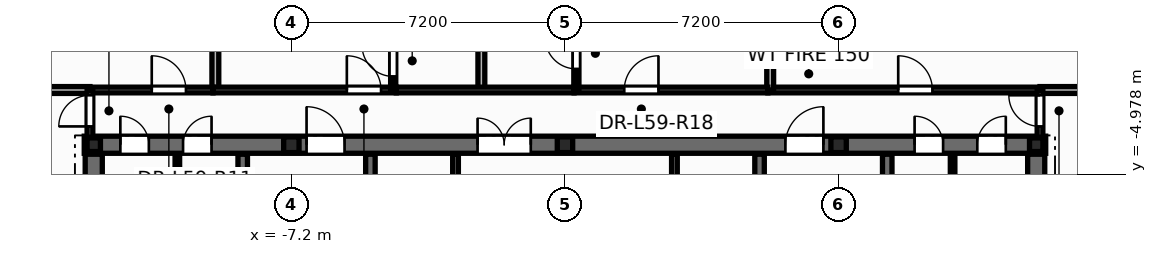
"""IFC4 building model, lengths in metres.
Left out: names, types, materials, properties, quantities, classifications, styles, units other than length and angle.
Written with IfcOpenShell. Run it as: python <this file> out.ifc"""

import sys

from ifc_helpers import new_model, si_unit, direction, frame, frame_2d, origin, origin_2d, place, context, subcontext, project, spatial, rectangle, i_section, extrude, element, fill, save


model = new_model("IFC4")
c1 = context("Model", 3, precision=1e-05, world=origin(), true_north=direction((0.0, 1.0)))
c2 = subcontext(c1, "Body", "Model", "MODEL_VIEW")
j1 = project(units=[si_unit("LENGTHUNIT", "METRE"), si_unit("PLANEANGLEUNIT", "RADIAN")], contexts=[c1])
p1 = place(None, origin())
s1 = spatial("IfcSite", under=j1, at=p1, CompositionType="ELEMENT")
p2 = place(p1, origin())
s2 = spatial("IfcBuilding", under=s1, at=p2, CompositionType="ELEMENT")
p3 = place(p2, frame((0.0, 0.0, 225.3)))
s3 = spatial("IfcBuildingStorey", under=s2, at=p3, CompositionType="ELEMENT", Elevation=225.3)
for number, where, z_axis, x_axis in (
    (1, (12.4, -4.2, 0.0), (0.0, 0.0, 1.0), (1.0, 0.0, 0.0)),
    (2, (-12.4, -4.2, 0.0), (0.0, 0.0, 1.0), (1.0, 0.0, 0.0)),
):
    element("IfcColumn", number, at=place(p3, frame(where, z_axis=z_axis, x_axis=x_axis)), inside=s3, PredefinedType="COLUMN", context=c2, shape_type="SweptSolid", body=[
        extrude(i_section(OverallWidth=0.352, OverallDepth=0.359, WebThickness=0.018, FlangeThickness=0.026, at=origin_2d()), origin(), (0.0, 0.0, 1.0), 3.6),
    ])
for number, where, z_axis, x_axis in (
    (3, (-7.2, -4.2, 0.0), (0.0, 0.0, 1.0), (1.0, 0.0, 0.0)),
    (4, (0.0, -4.2, 0.0), (0.0, 0.0, 1.0), (1.0, 0.0, 0.0)),
    (5, (7.2, -4.2, 0.0), (0.0, 0.0, 1.0), (1.0, 0.0, 0.0)),
):
    element("IfcColumn", number, at=place(p3, frame(where, z_axis=z_axis, x_axis=x_axis)), inside=s3, PredefinedType="PILASTER", context=c2, shape_type="SweptSolid", body=[
        extrude(i_section(OverallWidth=0.405, OverallDepth=0.414, WebThickness=0.022, FlangeThickness=0.032, at=origin_2d()), origin(), (0.0, 0.0, 1.0), 3.6),
    ])
p4 = place(p3, frame((-2.88, -7.1, 0.0), z_axis=(0.0, 0.0, 1.0), x_axis=(0.0, 1.0, 0.0)))
e6 = element("IfcWall", 6, at=p4, inside=s3, PredefinedType="PARTITIONING", context=c2, shape_type="SweptSolid", body=[
    extrude(rectangle(XDim=2.65, YDim=0.15, at=frame_2d((1.325, 0.0))), origin(), (0.0, 0.0, 1.0), 3.32),
])
p5 = place(p4, frame((0.85, 0.0, 0.0)))
e7 = element("IfcOpeningElement", 7, at=p5, cuts=e6, PredefinedType="OPENING", context=c2, shape_type="SweptSolid", body=[
    extrude(rectangle(XDim=0.886, YDim=2.104, at=frame_2d((0.44, 1.052))), frame((0.0, 0.085, 0.0), z_axis=(0.0, -1.0, 0.0), x_axis=(1.0, 0.0, 0.0)), (0.0, 0.0, 1.0), 0.17),
])
p6 = place(p3, frame((2.88, -7.1, 0.0), z_axis=(0.0, 0.0, 1.0), x_axis=(0.0, 1.0, 0.0)))
e8 = element("IfcWall", 8, at=p6, inside=s3, PredefinedType="PARTITIONING", context=c2, shape_type="SweptSolid", body=[
    extrude(rectangle(XDim=2.65, YDim=0.15, at=frame_2d((1.325, 0.0))), origin(), (0.0, 0.0, 1.0), 3.32),
])
p7 = place(p6, frame((0.85, 0.0, 0.0)))
e9 = element("IfcOpeningElement", 9, at=p7, cuts=e8, PredefinedType="OPENING", context=c2, shape_type="SweptSolid", body=[
    extrude(rectangle(XDim=0.886, YDim=2.104, at=frame_2d((0.44, 1.052))), frame((0.0, 0.085, 0.0), z_axis=(0.0, -1.0, 0.0), x_axis=(1.0, 0.0, 0.0)), (0.0, 0.0, 1.0), 0.17),
])
for number, where, z_axis, x_axis in (
    (10, (-10.2, -5.52, 0.0), (0.0, 0.0, 1.0), (0.0, 1.0, 0.0)),
    (11, (10.2, -5.52, 0.0), (0.0, 0.0, 1.0), (0.0, 1.0, 0.0)),
):
    element("IfcWall", number, at=place(p3, frame(where, z_axis=z_axis, x_axis=x_axis)), inside=s3, PredefinedType="PARTITIONING", context=c2, shape_type="SweptSolid", body=[
        extrude(rectangle(XDim=1.12, YDim=0.12, at=frame_2d((0.56, 0.0))), origin(), (0.0, 0.0, 1.0), 3.32),
    ])
p8 = place(p3, frame((-12.65, -4.2, 0.0), z_axis=(0.0, 0.0, 1.0), x_axis=(1.0, 0.0, 0.0)))
e12 = element("IfcWall", 12, at=p8, inside=s3, PredefinedType="SHEAR", context=c2, shape_type="SweptSolid", body=[
    extrude(rectangle(XDim=25.3, YDim=0.45, at=frame_2d((12.65, 0.0))), origin(), (0.0, 0.0, 1.0), 3.6),
])
p9 = place(p8, frame((0.95, 0.0, 0.0)))
e13 = element("IfcOpeningElement", 13, at=p9, cuts=e12, PredefinedType="OPENING", context=c2, shape_type="SweptSolid", body=[
    extrude(rectangle(XDim=0.756, YDim=2.054, at=frame_2d((0.375, 1.027))), frame((0.0, 0.235, 0.0), z_axis=(0.0, -1.0, 0.0), x_axis=(1.0, 0.0, 0.0)), (0.0, 0.0, 1.0), 0.47),
])
p10 = place(p8, frame((2.6, 0.0, 0.0)))
e14 = element("IfcOpeningElement", 14, at=p10, cuts=e12, PredefinedType="OPENING", context=c2, shape_type="SweptSolid", body=[
    extrude(rectangle(XDim=0.756, YDim=2.054, at=frame_2d((0.375, 1.027))), frame((0.0, 0.235, 0.0), z_axis=(0.0, -1.0, 0.0), x_axis=(1.0, 0.0, 0.0)), (0.0, 0.0, 1.0), 0.47),
])
p11 = place(p8, frame((21.85, 0.0, 0.0)))
e15 = element("IfcOpeningElement", 15, at=p11, cuts=e12, PredefinedType="OPENING", context=c2, shape_type="SweptSolid", body=[
    extrude(rectangle(XDim=0.756, YDim=2.054, at=frame_2d((0.375, 1.027))), frame((0.0, 0.235, 0.0), z_axis=(0.0, -1.0, 0.0), x_axis=(1.0, 0.0, 0.0)), (0.0, 0.0, 1.0), 0.47),
])
p12 = place(p8, frame((23.5, 0.0, 0.0)))
e16 = element("IfcOpeningElement", 16, at=p12, cuts=e12, PredefinedType="OPENING", context=c2, shape_type="SweptSolid", body=[
    extrude(rectangle(XDim=0.756, YDim=2.054, at=frame_2d((0.375, 1.027))), frame((0.0, 0.235, 0.0), z_axis=(0.0, -1.0, 0.0), x_axis=(1.0, 0.0, 0.0)), (0.0, 0.0, 1.0), 0.47),
])
p13 = place(p8, frame((5.85, 0.0, 0.0)))
e17 = element("IfcOpeningElement", 17, at=p13, cuts=e12, PredefinedType="OPENING", context=c2, shape_type="SweptSolid", body=[
    extrude(rectangle(XDim=1.006, YDim=2.104, at=frame_2d((0.5, 1.052))), frame((0.0, 0.235, 0.0), z_axis=(0.0, -1.0, 0.0), x_axis=(1.0, 0.0, 0.0)), (0.0, 0.0, 1.0), 0.47),
])
p14 = place(p8, frame((10.35, 0.0, 0.0)))
e18 = element("IfcOpeningElement", 18, at=p14, cuts=e12, PredefinedType="OPENING", context=c2, shape_type="SweptSolid", body=[
    extrude(rectangle(XDim=1.406, YDim=2.154, at=frame_2d((0.7, 1.077))), frame((0.0, 0.235, 0.0), z_axis=(0.0, -1.0, 0.0), x_axis=(1.0, 0.0, 0.0)), (0.0, 0.0, 1.0), 0.47),
])
p15 = place(p8, frame((18.45, 0.0, 0.0)))
e19 = element("IfcOpeningElement", 19, at=p15, cuts=e12, PredefinedType="OPENING", context=c2, shape_type="SweptSolid", body=[
    extrude(rectangle(XDim=1.006, YDim=2.104, at=frame_2d((0.5, 1.052))), frame((0.0, 0.235, 0.0), z_axis=(0.0, -1.0, 0.0), x_axis=(1.0, 0.0, 0.0)), (0.0, 0.0, 1.0), 0.47),
])
p16 = place(p3, frame((-8.48, -13.85, 0.0), z_axis=(0.0, 0.0, 1.0), x_axis=(0.0, 1.0, 0.0)))
e20 = element("IfcWall", 20, at=p16, inside=s3, PredefinedType="SHEAR", context=c2, shape_type="SweptSolid", body=[
    extrude(rectangle(XDim=9.4, YDim=0.25, at=frame_2d((4.7, 0.0))), origin(), (0.0, 0.0, 1.0), 3.6),
])
p17 = place(p16, frame((6.95, 0.0, 0.0)))
e21 = element("IfcOpeningElement", 21, at=p17, cuts=e20, PredefinedType="OPENING", context=c2, shape_type="SweptSolid", body=[
    extrude(rectangle(XDim=1.006, YDim=2.104, at=frame_2d((0.5, 1.052))), frame((0.0, 0.135, 0.0), z_axis=(0.0, -1.0, 0.0), x_axis=(1.0, 0.0, 0.0)), (0.0, 0.0, 1.0), 0.27),
])
p18 = place(p3, frame((8.48, -13.85, 0.0), z_axis=(0.0, 0.0, 1.0), x_axis=(0.0, 1.0, 0.0)))
e22 = element("IfcWall", 22, at=p18, inside=s3, PredefinedType="SHEAR", context=c2, shape_type="SweptSolid", body=[
    extrude(rectangle(XDim=9.4, YDim=0.25, at=frame_2d((4.7, 0.0))), origin(), (0.0, 0.0, 1.0), 3.6),
])
p19 = place(p18, frame((6.95, 0.0, 0.0)))
e23 = element("IfcOpeningElement", 23, at=p19, cuts=e22, PredefinedType="OPENING", context=c2, shape_type="SweptSolid", body=[
    extrude(rectangle(XDim=1.006, YDim=2.104, at=frame_2d((0.5, 1.052))), frame((0.0, 0.135, 0.0), z_axis=(0.0, -1.0, 0.0), x_axis=(1.0, 0.0, 0.0)), (0.0, 0.0, 1.0), 0.27),
])
for number, where, z_axis, x_axis in (
    (24, (-5.12, -13.85, 0.0), (0.0, 0.0, 1.0), (0.0, 1.0, 0.0)),
    (25, (5.12, -13.85, 0.0), (0.0, 0.0, 1.0), (0.0, 1.0, 0.0)),
):
    element("IfcWall", number, at=place(p3, frame(where, z_axis=z_axis, x_axis=x_axis)), inside=s3, PredefinedType="SHEAR", context=c2, shape_type="SweptSolid", body=[
        extrude(rectangle(XDim=9.4, YDim=0.25, at=frame_2d((4.7, 0.0))), origin(), (0.0, 0.0, 1.0), 3.6),
    ])
for number, where, z_axis, x_axis in (
    (26, (-12.4, -13.85, 0.0), (0.0, 0.0, 1.0), (0.0, 1.0, 0.0)),
    (27, (12.4, -13.85, 0.0), (0.0, 0.0, 1.0), (0.0, 1.0, 0.0)),
):
    element("IfcWall", number, at=place(p3, frame(where, z_axis=z_axis, x_axis=x_axis)), inside=s3, PredefinedType="SHEAR", context=c2, shape_type="SweptSolid", body=[
        extrude(rectangle(XDim=9.4, YDim=0.45, at=frame_2d((4.7, 0.0))), origin(), (0.0, 0.0, 1.0), 3.6),
    ])
p20 = place(p3, frame((-9.2, -2.76, 0.0), z_axis=(0.0, 0.0, 1.0), x_axis=(0.0, 1.0, 0.0)))
e28 = element("IfcWall", 28, at=p20, inside=s3, PredefinedType="PARTITIONING", context=c2, shape_type="SweptSolid", body=[
    extrude(rectangle(XDim=7.742, YDim=0.18, at=frame_2d((3.871, 0.0))), origin(), (0.0, 0.0, 1.0), 2.595),
])
p21 = place(p3, frame((5.34, -2.76, 0.0), z_axis=(0.0, 0.0, 1.0), x_axis=(1.0, 0.0, 0.0)))
e29 = element("IfcWall", 29, at=p21, inside=s3, PredefinedType="PARTITIONING", context=c2, shape_type="SweptSolid", body=[
    extrude(rectangle(XDim=7.16, YDim=0.15, at=frame_2d((3.58, 0.0))), origin(), (0.0, 0.0, 1.0), 2.295),
])
p22 = place(p21, frame((3.429, 0.0, 0.0)))
e30 = element("IfcOpeningElement", 30, at=p22, cuts=e29, PredefinedType="OPENING", context=c2, shape_type="SweptSolid", body=[
    extrude(rectangle(XDim=0.906, YDim=2.104, at=frame_2d((0.45, 1.052))), frame((0.0, 0.085, 0.0), z_axis=(0.0, -1.0, 0.0), x_axis=(1.0, 0.0, 0.0)), (0.0, 0.0, 1.0), 0.17),
])
p23 = place(p3, frame((5.4, -2.76, 0.0), z_axis=(0.0, 0.0, 1.0), x_axis=(0.0, 1.0, 0.0)))
e31 = element("IfcWall", 31, at=p23, inside=s3, PredefinedType="PARTITIONING", context=c2, shape_type="SweptSolid", body=[
    extrude(rectangle(XDim=13.037, YDim=0.18, at=frame_2d((6.518, 0.0))), origin(), (0.0, 0.0, 1.0), 2.295),
])
p24 = place(p3, frame((0.24, -2.76, 0.0), z_axis=(0.0, 0.0, 1.0), x_axis=(1.0, 0.0, 0.0)))
e32 = element("IfcWall", 32, at=p24, inside=s3, PredefinedType="PARTITIONING", context=c2, shape_type="SweptSolid", body=[
    extrude(rectangle(XDim=5.098, YDim=0.15, at=frame_2d((2.549, 0.0))), origin(), (0.0, 0.0, 1.0), 2.939),
])
p25 = place(p24, frame((1.32, 0.0, 0.0)))
e33 = element("IfcOpeningElement", 33, at=p25, cuts=e32, PredefinedType="OPENING", context=c2, shape_type="SweptSolid", body=[
    extrude(rectangle(XDim=0.906, YDim=2.104, at=frame_2d((0.45, 1.052))), frame((0.0, 0.085, 0.0), z_axis=(0.0, -1.0, 0.0), x_axis=(1.0, 0.0, 0.0)), (0.0, 0.0, 1.0), 0.17),
])
p26 = place(p3, frame((-9.26, -2.76, 0.0), z_axis=(0.0, 0.0, 1.0), x_axis=(1.0, 0.0, 0.0)))
e34 = element("IfcWall", 34, at=p26, inside=s3, PredefinedType="PARTITIONING", context=c2, shape_type="SweptSolid", body=[
    extrude(rectangle(XDim=4.82, YDim=0.15, at=frame_2d((2.41, 0.0))), origin(), (0.0, 0.0, 1.0), 2.295),
])
p27 = place(p26, frame((3.52, 0.0, 0.0)))
e35 = element("IfcOpeningElement", 35, at=p27, cuts=e34, PredefinedType="OPENING", context=c2, shape_type="SweptSolid", body=[
    extrude(rectangle(XDim=0.906, YDim=2.104, at=frame_2d((0.45, 1.052))), frame((0.0, 0.085, 0.0), z_axis=(0.0, -1.0, 0.0), x_axis=(1.0, 0.0, 0.0)), (0.0, 0.0, 1.0), 0.17),
])
p28 = place(p3, frame((-2.2, -2.76, 0.0), z_axis=(0.0, 0.0, 1.0), x_axis=(0.0, 1.0, 0.0)))
e36 = element("IfcWall", 36, at=p28, inside=s3, PredefinedType="PARTITIONING", context=c2, shape_type="SweptSolid", body=[
    extrude(rectangle(XDim=9.62, YDim=0.18, at=frame_2d((4.81, 0.0))), origin(), (0.0, 0.0, 1.0), 2.295),
])
p29 = place(p3, frame((-12.5, -2.76, 0.0), z_axis=(0.0, 0.0, 1.0), x_axis=(1.0, 0.0, 0.0)))
e37 = element("IfcWall", 37, at=p29, inside=s3, PredefinedType="PARTITIONING", context=c2, shape_type="SweptSolid", body=[
    extrude(rectangle(XDim=3.238, YDim=0.15, at=frame_2d((1.619, 0.0))), origin(), (0.0, 0.0, 1.0), 3.32),
])
p30 = place(p29, frame((1.626, 0.0, 0.0)))
e38 = element("IfcOpeningElement", 38, at=p30, cuts=e37, PredefinedType="OPENING", context=c2, shape_type="SweptSolid", body=[
    extrude(rectangle(XDim=0.906, YDim=2.104, at=frame_2d((0.45, 1.052))), frame((0.0, 0.085, 0.0), z_axis=(0.0, -1.0, 0.0), x_axis=(1.0, 0.0, 0.0)), (0.0, 0.0, 1.0), 0.17),
])
p31 = place(p3, frame((-4.52, -2.76, 0.0), z_axis=(0.0, 0.0, 1.0), x_axis=(0.0, 1.0, 0.0)))
e39 = element("IfcWall", 39, at=p31, inside=s3, PredefinedType="PARTITIONING", context=c2, shape_type="SweptSolid", body=[
    extrude(rectangle(XDim=2.92, YDim=0.135, at=frame_2d((1.46, 0.0))), origin(), (0.0, 0.0, 1.0), 3.32),
])
p32 = place(p31, frame((0.357, 0.0, 0.0)))
e40 = element("IfcOpeningElement", 40, at=p32, cuts=e39, PredefinedType="OPENING", context=c2, shape_type="SweptSolid", body=[
    extrude(rectangle(XDim=0.826, YDim=2.104, at=frame_2d((0.41, 1.052))), frame((0.0, 0.078, 0.0), z_axis=(0.0, -1.0, 0.0), x_axis=(1.0, 0.0, 0.0)), (0.0, 0.0, 1.0), 0.155),
])
p33 = place(p3, frame((0.3, -2.76, 0.0), z_axis=(0.0, 0.0, 1.0), x_axis=(0.0, 1.0, 0.0)))
e41 = element("IfcWall", 41, at=p33, inside=s3, PredefinedType="PARTITIONING", context=c2, shape_type="SweptSolid", body=[
    extrude(rectangle(XDim=2.92, YDim=0.135, at=frame_2d((1.46, 0.0))), origin(), (0.0, 0.0, 1.0), 2.295),
])
p34 = place(p33, frame((0.555, 0.0, 0.0)))
e42 = element("IfcOpeningElement", 42, at=p34, cuts=e41, PredefinedType="OPENING", context=c2, shape_type="SweptSolid", body=[
    extrude(rectangle(XDim=0.826, YDim=2.104, at=frame_2d((0.41, 1.052))), frame((0.0, 0.078, 0.0), z_axis=(0.0, -1.0, 0.0), x_axis=(1.0, 0.0, 0.0)), (0.0, 0.0, 1.0), 0.155),
])
p35 = place(p3, frame((-4.438, -2.76, 0.0), z_axis=(0.0, 0.0, 1.0), x_axis=(1.0, 0.0, 0.0)))
e43 = element("IfcWall", 43, at=p35, inside=s3, PredefinedType="PARTITIONING", context=c2, shape_type="SweptSolid", body=[
    extrude(rectangle(XDim=4.676, YDim=0.15, at=frame_2d((2.338, 0.0))), origin(), (0.0, 0.0, 1.0), 2.295),
])
for number, where, z_axis, x_axis in (
    (44, (-14.757, -2.76, 0.0), (0.0, 0.0, 1.0), (1.0, 0.0, 0.0)),
    (45, (12.5, -2.76, 0.0), (0.0, 0.0, 1.0), (1.0, 0.0, 0.0)),
):
    element("IfcWall", number, at=place(p3, frame(where, z_axis=z_axis, x_axis=x_axis)), inside=s3, PredefinedType="PARTITIONING", context=c2, shape_type="SweptSolid", body=[
        extrude(rectangle(XDim=2.257, YDim=0.18, at=frame_2d((1.129, 0.0))), origin(), (0.0, 0.0, 1.0), 2.595),
    ])
p36 = place(p3, frame((-12.5, -4.24, 0.0), z_axis=(0.0, 0.0, 1.0), x_axis=(0.0, 1.0, 0.0)))
e46 = element("IfcWall", 46, at=p36, inside=s3, PredefinedType="PARTITIONING", context=c2, shape_type="SweptSolid", body=[
    extrude(rectangle(XDim=1.48, YDim=0.15, at=frame_2d((0.74, 0.0))), origin(), (0.0, 0.0, 1.0), 2.295),
])
p37 = place(p36, frame((0.522, 0.0, 0.0)))
e47 = element("IfcOpeningElement", 47, at=p37, cuts=e46, PredefinedType="OPENING", context=c2, shape_type="SweptSolid", body=[
    extrude(rectangle(XDim=0.826, YDim=2.104, at=frame_2d((0.41, 1.052))), frame((0.0, 0.085, 0.0), z_axis=(0.0, -1.0, 0.0), x_axis=(1.0, 0.0, 0.0)), (0.0, 0.0, 1.0), 0.17),
])
p38 = place(p3, frame((12.5, -4.24, 0.0), z_axis=(0.0, 0.0, 1.0), x_axis=(0.0, 1.0, 0.0)))
e48 = element("IfcWall", 48, at=p38, inside=s3, PredefinedType="PARTITIONING", context=c2, shape_type="SweptSolid", body=[
    extrude(rectangle(XDim=1.48, YDim=0.15, at=frame_2d((0.74, 0.0))), origin(), (0.0, 0.0, 1.0), 2.295),
])
p39 = place(p38, frame((0.522, 0.0, 0.0)))
e49 = element("IfcOpeningElement", 49, at=p39, cuts=e48, PredefinedType="OPENING", context=c2, shape_type="SweptSolid", body=[
    extrude(rectangle(XDim=0.826, YDim=2.104, at=frame_2d((0.41, 1.052))), frame((0.0, 0.085, 0.0), z_axis=(0.0, -1.0, 0.0), x_axis=(1.0, 0.0, 0.0)), (0.0, 0.0, 1.0), 0.17),
])
p40 = place(p9, origin())
e50 = element("IfcDoor", 50, at=p40, inside=s3, OperationType="SINGLE_SWING_LEFT", PredefinedType="DOOR", context=c2, shape_type="SweptSolid", body=[
    extrude(rectangle(XDim=0.75, YDim=2.05, at=frame_2d((0.375, 1.025))), frame((0.0, 0.025, 0.0), z_axis=(0.0, -1.0, 0.0), x_axis=(1.0, 0.0, 0.0)), (0.0, 0.0, 1.0), 0.05),
])
fill(e13, e50)
p41 = place(p10, origin())
e51 = element("IfcDoor", 51, at=p41, inside=s3, OperationType="SINGLE_SWING_RIGHT", PredefinedType="DOOR", context=c2, shape_type="SweptSolid", body=[
    extrude(rectangle(XDim=0.75, YDim=2.05, at=frame_2d((0.375, 1.025))), frame((0.0, 0.025, 0.0), z_axis=(0.0, -1.0, 0.0), x_axis=(1.0, 0.0, 0.0)), (0.0, 0.0, 1.0), 0.05),
])
fill(e14, e51)
p42 = place(p11, origin())
e52 = element("IfcDoor", 52, at=p42, inside=s3, OperationType="SINGLE_SWING_LEFT", PredefinedType="DOOR", context=c2, shape_type="SweptSolid", body=[
    extrude(rectangle(XDim=0.75, YDim=2.05, at=frame_2d((0.375, 1.025))), frame((0.0, 0.025, 0.0), z_axis=(0.0, -1.0, 0.0), x_axis=(1.0, 0.0, 0.0)), (0.0, 0.0, 1.0), 0.05),
])
fill(e15, e52)
p43 = place(p12, origin())
e53 = element("IfcDoor", 53, at=p43, inside=s3, OperationType="SINGLE_SWING_RIGHT", PredefinedType="DOOR", context=c2, shape_type="SweptSolid", body=[
    extrude(rectangle(XDim=0.75, YDim=2.05, at=frame_2d((0.375, 1.025))), frame((0.0, 0.025, 0.0), z_axis=(0.0, -1.0, 0.0), x_axis=(1.0, 0.0, 0.0)), (0.0, 0.0, 1.0), 0.05),
])
fill(e16, e53)
p44 = place(p13, origin())
e54 = element("IfcDoor", 54, at=p44, inside=s3, OperationType="SINGLE_SWING_LEFT", PredefinedType="DOOR", context=c2, shape_type="SweptSolid", body=[
    extrude(rectangle(XDim=1.0, YDim=2.1, at=frame_2d((0.5, 1.05))), frame((0.0, 0.025, 0.0), z_axis=(0.0, -1.0, 0.0), x_axis=(1.0, 0.0, 0.0)), (0.0, 0.0, 1.0), 0.05),
])
fill(e17, e54)
p45 = place(p14, origin())
e55 = element("IfcDoor", 55, at=p45, inside=s3, OperationType="DOUBLE_DOOR_SINGLE_SWING", PredefinedType="DOOR", context=c2, shape_type="SweptSolid", body=[
    extrude(rectangle(XDim=1.4, YDim=2.15, at=frame_2d((0.7, 1.075))), frame((0.0, 0.025, 0.0), z_axis=(0.0, -1.0, 0.0), x_axis=(1.0, 0.0, 0.0)), (0.0, 0.0, 1.0), 0.05),
])
fill(e18, e55)
p46 = place(p15, origin())
e56 = element("IfcDoor", 56, at=p46, inside=s3, OperationType="SINGLE_SWING_RIGHT", PredefinedType="DOOR", context=c2, shape_type="SweptSolid", body=[
    extrude(rectangle(XDim=1.0, YDim=2.1, at=frame_2d((0.5, 1.05))), frame((0.0, 0.025, 0.0), z_axis=(0.0, -1.0, 0.0), x_axis=(1.0, 0.0, 0.0)), (0.0, 0.0, 1.0), 0.05),
])
fill(e19, e56)
p47 = place(p37, origin())
e57 = element("IfcDoor", 57, at=p47, inside=s3, OperationType="SINGLE_SWING_LEFT", PredefinedType="DOOR", context=c2, shape_type="SweptSolid", body=[
    extrude(rectangle(XDim=0.82, YDim=2.1, at=frame_2d((0.41, 1.05))), frame((0.0, 0.025, 0.0), z_axis=(0.0, -1.0, 0.0), x_axis=(1.0, 0.0, 0.0)), (0.0, 0.0, 1.0), 0.05),
])
fill(e47, e57)
p48 = place(p39, origin())
e58 = element("IfcDoor", 58, at=p48, inside=s3, OperationType="SINGLE_SWING_RIGHT", PredefinedType="DOOR", context=c2, shape_type="SweptSolid", body=[
    extrude(rectangle(XDim=0.82, YDim=2.1, at=frame_2d((0.41, 1.05))), frame((0.0, 0.025, 0.0), z_axis=(0.0, -1.0, 0.0), x_axis=(1.0, 0.0, 0.0)), (0.0, 0.0, 1.0), 0.05),
])
fill(e49, e58)
p49 = place(p30, origin())
e59 = element("IfcDoor", 59, at=p49, inside=s3, OperationType="SINGLE_SWING_LEFT", PredefinedType="DOOR", context=c2, shape_type="SweptSolid", body=[
    extrude(rectangle(XDim=0.9, YDim=2.1, at=frame_2d((0.45, 1.05))), frame((0.0, 0.025, 0.0), z_axis=(0.0, -1.0, 0.0), x_axis=(1.0, 0.0, 0.0)), (0.0, 0.0, 1.0), 0.05),
])
fill(e38, e59)
p50 = place(p32, origin())
e60 = element("IfcDoor", 60, at=p50, inside=s3, OperationType="SINGLE_SWING_RIGHT", PredefinedType="DOOR", context=c2, shape_type="SweptSolid", body=[
    extrude(rectangle(XDim=0.82, YDim=2.1, at=frame_2d((0.41, 1.05))), frame((0.0, 0.025, 0.0), z_axis=(0.0, -1.0, 0.0), x_axis=(1.0, 0.0, 0.0)), (0.0, 0.0, 1.0), 0.05),
])
fill(e40, e60)
p51 = place(p27, origin())
e61 = element("IfcDoor", 61, at=p51, inside=s3, OperationType="SINGLE_SWING_LEFT", PredefinedType="DOOR", context=c2, shape_type="SweptSolid", body=[
    extrude(rectangle(XDim=0.9, YDim=2.1, at=frame_2d((0.45, 1.05))), frame((0.0, 0.025, 0.0), z_axis=(0.0, -1.0, 0.0), x_axis=(1.0, 0.0, 0.0)), (0.0, 0.0, 1.0), 0.05),
])
fill(e35, e61)
p52 = place(p34, origin())
e62 = element("IfcDoor", 62, at=p52, inside=s3, OperationType="SINGLE_SWING_RIGHT", PredefinedType="DOOR", context=c2, shape_type="SweptSolid", body=[
    extrude(rectangle(XDim=0.82, YDim=2.1, at=frame_2d((0.41, 1.05))), frame((0.0, 0.025, 0.0), z_axis=(0.0, -1.0, 0.0), x_axis=(1.0, 0.0, 0.0)), (0.0, 0.0, 1.0), 0.05),
])
fill(e42, e62)
p53 = place(p25, origin())
e63 = element("IfcDoor", 63, at=p53, inside=s3, OperationType="SINGLE_SWING_RIGHT", PredefinedType="DOOR", context=c2, shape_type="SweptSolid", body=[
    extrude(rectangle(XDim=0.9, YDim=2.1, at=frame_2d((0.45, 1.05))), frame((0.0, 0.025, 0.0), z_axis=(0.0, -1.0, 0.0), x_axis=(1.0, 0.0, 0.0)), (0.0, 0.0, 1.0), 0.05),
])
fill(e33, e63)
p54 = place(p22, origin())
e64 = element("IfcDoor", 64, at=p54, inside=s3, OperationType="SINGLE_SWING_LEFT", PredefinedType="DOOR", context=c2, shape_type="SweptSolid", body=[
    extrude(rectangle(XDim=0.9, YDim=2.1, at=frame_2d((0.45, 1.05))), frame((0.0, 0.025, 0.0), z_axis=(0.0, -1.0, 0.0), x_axis=(1.0, 0.0, 0.0)), (0.0, 0.0, 1.0), 0.05),
])
fill(e30, e64)
save(model, sys.argv[1])
